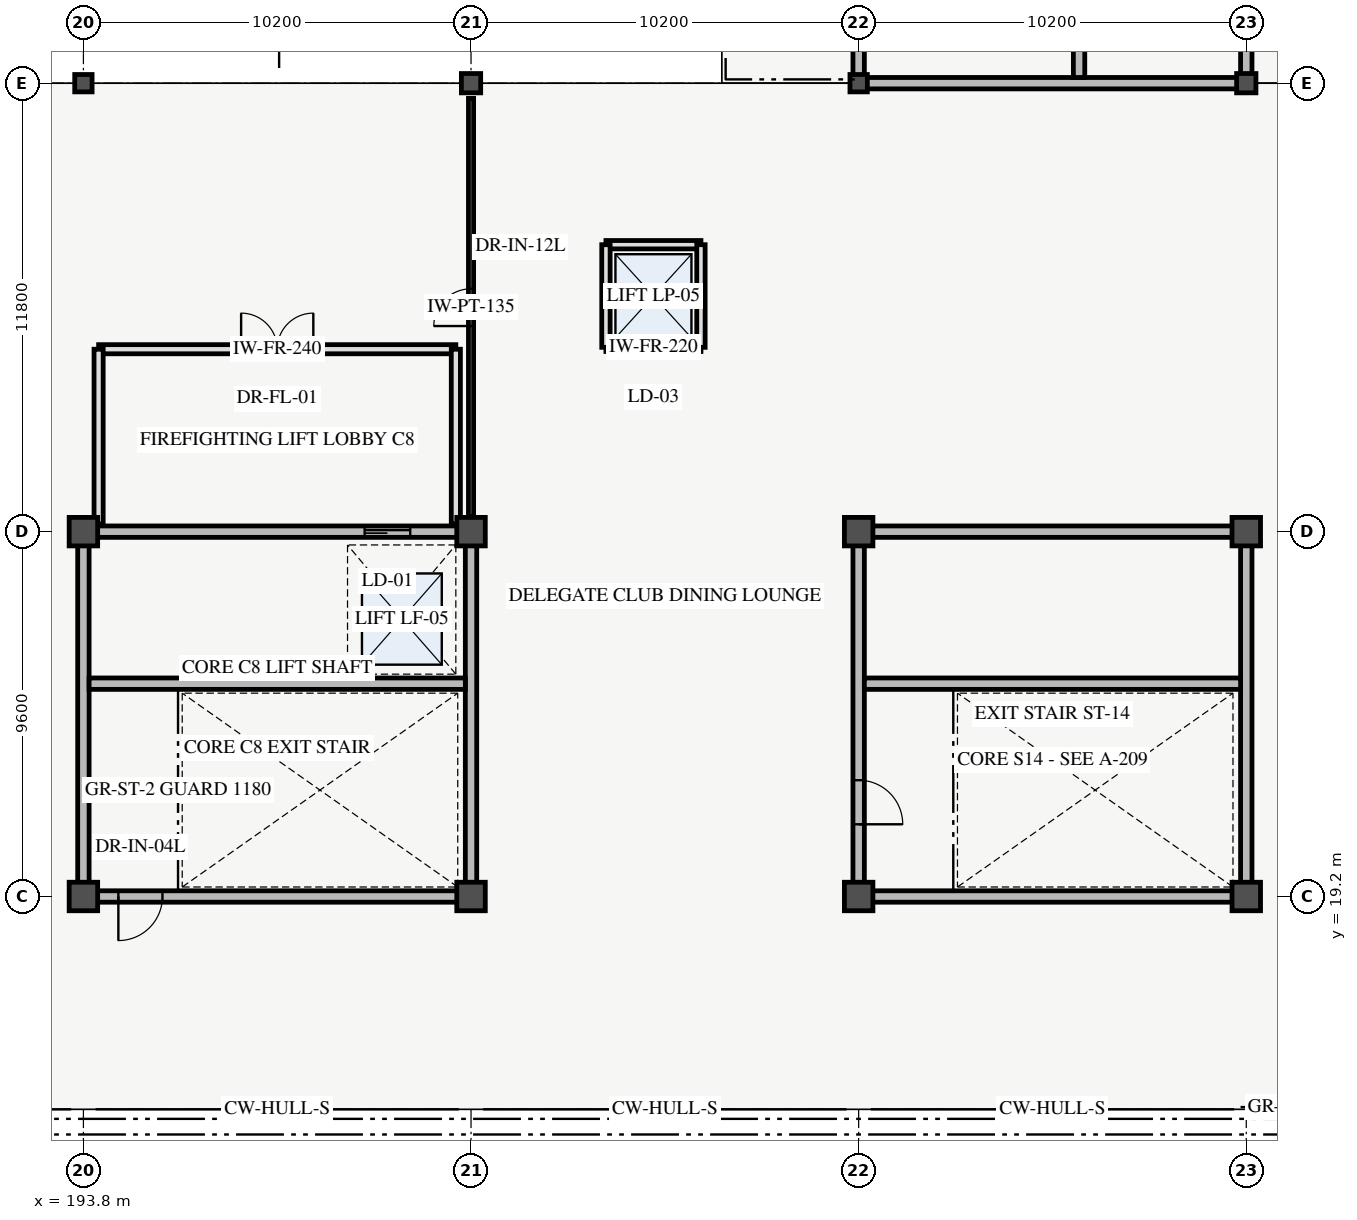
"""IFC4 building model, lengths in metres.
Left out: names, types, materials, properties, quantities, classifications, styles, units other than length and angle.
Written with IfcOpenShell. Run it as: python <this file> out.ifc"""

import sys

from ifc_helpers import new_model, si_unit, direction, frame, frame_2d, origin, origin_2d, place, context, subcontext, project, spatial, rectangle, hollow_circle, extrude, element, fill, save


model = new_model("IFC4")
c1 = context("Model", 3, precision=1e-05, world=origin(), true_north=direction((0.0, 1.0)))
c2 = subcontext(c1, "Body", "Model", "MODEL_VIEW")
j1 = project(units=[si_unit("LENGTHUNIT", "METRE"), si_unit("PLANEANGLEUNIT", "RADIAN")], contexts=[c1])
p1 = place(None, origin())
s1 = spatial("IfcSite", under=j1, at=p1, CompositionType="ELEMENT")
p2 = place(p1, origin())
s2 = spatial("IfcBuilding", under=s1, at=p2, CompositionType="ELEMENT")
p3 = place(p2, frame((0.0, 0.0, 10.8)))
s3 = spatial("IfcBuildingStorey", under=s2, at=p3, CompositionType="ELEMENT", Elevation=10.8)
for number, where, z_axis, x_axis in (
    (1, (193.8, 19.2, 0.0), (0.0, 0.0, 1.0), (1.0, 0.0, 0.0)),
    (2, (193.8, 28.8, 0.0), (0.0, 0.0, 1.0), (1.0, 0.0, 0.0)),
):
    element("IfcColumn", number, at=place(p3, frame(where, z_axis=z_axis, x_axis=x_axis)), inside=s3, PredefinedType="COLUMN", context=c2, shape_type="SweptSolid", body=[
        extrude(rectangle(XDim=0.75, YDim=0.75, at=origin_2d()), origin(), (0.0, 0.0, 1.0), 4.2),
    ])
p4 = place(p3, frame((193.8, 40.6, 0.0), z_axis=(0.0, 0.0, 1.0), x_axis=(1.0, 0.0, 0.0)))
e3 = element("IfcColumn", 3, at=p4, inside=s3, PredefinedType="COLUMN", context=c2, shape_type="SweptSolid", body=[
    extrude(hollow_circle(Radius=0.229, WallThickness=0.02, at=origin_2d()), origin(), (0.0, 0.0, 1.0), 4.2),
])
for number, where, z_axis, x_axis in (
    (4, (204.0, 19.2, 0.0), (0.0, 0.0, 1.0), (1.0, 0.0, 0.0)),
    (5, (204.0, 28.8, 0.0), (0.0, 0.0, 1.0), (1.0, 0.0, 0.0)),
):
    element("IfcColumn", number, at=place(p3, frame(where, z_axis=z_axis, x_axis=x_axis)), inside=s3, PredefinedType="COLUMN", context=c2, shape_type="SweptSolid", body=[
        extrude(rectangle(XDim=0.75, YDim=0.75, at=origin_2d()), origin(), (0.0, 0.0, 1.0), 4.2),
    ])
p5 = place(p3, frame((204.0, 40.6, 0.0), z_axis=(0.0, 0.0, 1.0), x_axis=(1.0, 0.0, 0.0)))
e6 = element("IfcColumn", 6, at=p5, inside=s3, PredefinedType="COLUMN", context=c2, shape_type="SweptSolid", body=[
    extrude(hollow_circle(Radius=0.254, WallThickness=0.02, at=origin_2d()), origin(), (0.0, 0.0, 1.0), 4.2),
])
for number, where, z_axis, x_axis in (
    (7, (214.2, 19.2, 0.0), (0.0, 0.0, 1.0), (1.0, 0.0, 0.0)),
    (8, (214.2, 28.8, 0.0), (0.0, 0.0, 1.0), (1.0, 0.0, 0.0)),
):
    element("IfcColumn", number, at=place(p3, frame(where, z_axis=z_axis, x_axis=x_axis)), inside=s3, PredefinedType="COLUMN", context=c2, shape_type="SweptSolid", body=[
        extrude(rectangle(XDim=0.75, YDim=0.75, at=origin_2d()), origin(), (0.0, 0.0, 1.0), 4.2),
    ])
p6 = place(p3, frame((214.2, 40.6, 0.0), z_axis=(0.0, 0.0, 1.0), x_axis=(1.0, 0.0, 0.0)))
e9 = element("IfcColumn", 9, at=p6, inside=s3, PredefinedType="COLUMN", context=c2, shape_type="SweptSolid", body=[
    extrude(hollow_circle(Radius=0.229, WallThickness=0.02, at=origin_2d()), origin(), (0.0, 0.0, 1.0), 4.2),
])
for number, where, z_axis, x_axis in (
    (10, (224.4, 19.2, 0.0), (0.0, 0.0, 1.0), (1.0, 0.0, 0.0)),
    (11, (224.4, 28.8, 0.0), (0.0, 0.0, 1.0), (1.0, 0.0, 0.0)),
):
    element("IfcColumn", number, at=place(p3, frame(where, z_axis=z_axis, x_axis=x_axis)), inside=s3, PredefinedType="COLUMN", context=c2, shape_type="SweptSolid", body=[
        extrude(rectangle(XDim=0.75, YDim=0.75, at=origin_2d()), origin(), (0.0, 0.0, 1.0), 4.2),
    ])
p7 = place(p3, frame((224.4, 40.6, 0.0), z_axis=(0.0, 0.0, 1.0), x_axis=(1.0, 0.0, 0.0)))
e12 = element("IfcColumn", 12, at=p7, inside=s3, PredefinedType="COLUMN", context=c2, shape_type="SweptSolid", body=[
    extrude(hollow_circle(Radius=0.254, WallThickness=0.02, at=origin_2d()), origin(), (0.0, 0.0, 1.0), 4.2),
])
p8 = place(p3, frame((193.8, 19.2, 0.0), z_axis=(0.0, 0.0, 1.0), x_axis=(1.0, 0.0, 0.0)))
e13 = element("IfcWall", 13, at=p8, inside=s3, PredefinedType="SHEAR", context=c2, shape_type="SweptSolid", body=[
    extrude(rectangle(XDim=10.2, YDim=0.3, at=frame_2d((5.1, 0.0))), origin(), (0.0, 0.0, 1.0), 4.2),
])
p9 = place(p8, frame((0.92, 0.0, 0.0)))
e14 = element("IfcOpeningElement", 14, at=p9, cuts=e13, PredefinedType="OPENING", context=c2, shape_type="SweptSolid", body=[
    extrude(rectangle(XDim=1.16, YDim=2.2, at=frame_2d((0.58, 1.1))), frame((0.0, 0.16, 0.0), z_axis=(0.0, -1.0, 0.0), x_axis=(1.0, 0.0, 0.0)), (0.0, 0.0, 1.0), 0.32),
])
p10 = place(p3, frame((193.8, 28.8, 0.0), z_axis=(0.0, 0.0, 1.0), x_axis=(1.0, 0.0, 0.0)))
e15 = element("IfcWall", 15, at=p10, inside=s3, PredefinedType="SHEAR", context=c2, shape_type="SweptSolid", body=[
    extrude(rectangle(XDim=10.2, YDim=0.3, at=frame_2d((5.1, 0.0))), origin(), (0.0, 0.0, 1.0), 4.2),
])
p11 = place(p10, frame((7.4, 0.0, 0.0)))
e16 = element("IfcOpeningElement", 16, at=p11, cuts=e15, PredefinedType="OPENING", context=c2, shape_type="SweptSolid", body=[
    extrude(rectangle(XDim=1.2, YDim=2.25, at=frame_2d((0.6, 1.125))), frame((0.0, 0.16, 0.0), z_axis=(0.0, -1.0, 0.0), x_axis=(1.0, 0.0, 0.0)), (0.0, 0.0, 1.0), 0.32),
])
for number, where, z_axis, x_axis in (
    (17, (193.8, 19.2, 0.0), (0.0, 0.0, 1.0), (0.0, 1.0, 0.0)),
    (18, (204.0, 19.2, 0.0), (0.0, 0.0, 1.0), (0.0, 1.0, 0.0)),
):
    element("IfcWall", number, at=place(p3, frame(where, z_axis=z_axis, x_axis=x_axis)), inside=s3, PredefinedType="SHEAR", context=c2, shape_type="SweptSolid", body=[
        extrude(rectangle(XDim=9.6, YDim=0.3, at=frame_2d((4.8, 0.0))), origin(), (0.0, 0.0, 1.0), 4.2),
    ])
p12 = place(p3, frame((193.95, 24.8, 0.0), z_axis=(0.0, 0.0, 1.0), x_axis=(1.0, 0.0, 0.0)))
e19 = element("IfcWall", 19, at=p12, inside=s3, PredefinedType="SHEAR", context=c2, shape_type="SweptSolid", body=[
    extrude(rectangle(XDim=9.9, YDim=0.3, at=frame_2d((4.95, 0.0))), origin(), (0.0, 0.0, 1.0), 4.2),
])
for number, where, z_axis, x_axis in (
    (20, (214.2, 19.2, 0.0), (0.0, 0.0, 1.0), (1.0, 0.0, 0.0)),
    (21, (214.2, 28.8, 0.0), (0.0, 0.0, 1.0), (1.0, 0.0, 0.0)),
):
    element("IfcWall", number, at=place(p3, frame(where, z_axis=z_axis, x_axis=x_axis)), inside=s3, PredefinedType="SHEAR", context=c2, shape_type="SweptSolid", body=[
        extrude(rectangle(XDim=10.2, YDim=0.3, at=frame_2d((5.1, 0.0))), origin(), (0.0, 0.0, 1.0), 4.2),
    ])
p13 = place(p3, frame((214.2, 19.2, 0.0), z_axis=(0.0, 0.0, 1.0), x_axis=(0.0, 1.0, 0.0)))
e22 = element("IfcWall", 22, at=p13, inside=s3, PredefinedType="SHEAR", context=c2, shape_type="SweptSolid", body=[
    extrude(rectangle(XDim=9.6, YDim=0.3, at=frame_2d((4.8, 0.0))), origin(), (0.0, 0.0, 1.0), 4.2),
])
p14 = place(p13, frame((1.9, 0.0, 0.0)))
e23 = element("IfcOpeningElement", 23, at=p14, cuts=e22, PredefinedType="OPENING", context=c2, shape_type="SweptSolid", body=[
    extrude(rectangle(XDim=1.16, YDim=2.2, at=frame_2d((0.58, 1.1))), frame((0.0, 0.16, 0.0), z_axis=(0.0, -1.0, 0.0), x_axis=(1.0, 0.0, 0.0)), (0.0, 0.0, 1.0), 0.32),
])
p15 = place(p3, frame((224.4, 19.2, 0.0), z_axis=(0.0, 0.0, 1.0), x_axis=(0.0, 1.0, 0.0)))
e24 = element("IfcWall", 24, at=p15, inside=s3, PredefinedType="SHEAR", context=c2, shape_type="SweptSolid", body=[
    extrude(rectangle(XDim=9.6, YDim=0.3, at=frame_2d((4.8, 0.0))), origin(), (0.0, 0.0, 1.0), 4.2),
])
p16 = place(p3, frame((214.35, 24.8, 0.0), z_axis=(0.0, 0.0, 1.0), x_axis=(1.0, 0.0, 0.0)))
e25 = element("IfcWall", 25, at=p16, inside=s3, PredefinedType="SHEAR", context=c2, shape_type="SweptSolid", body=[
    extrude(rectangle(XDim=9.9, YDim=0.3, at=frame_2d((4.95, 0.0))), origin(), (0.0, 0.0, 1.0), 4.2),
])
p17 = place(p3, frame((214.2, 40.6, 0.0), z_axis=(0.0, 0.0, 1.0), x_axis=(1.0, 0.0, 0.0)))
e26 = element("IfcWall", 26, at=p17, inside=s3, PredefinedType="SHEAR", context=c2, shape_type="SweptSolid", body=[
    extrude(rectangle(XDim=10.2, YDim=0.3, at=frame_2d((5.1, 0.0))), origin(), (0.0, 0.0, 1.0), 4.2),
])
p18 = place(p3, frame((214.2, 40.6, 0.0), z_axis=(0.0, 0.0, 1.0), x_axis=(0.0, 1.0, 0.0)))
e27 = element("IfcWall", 27, at=p18, inside=s3, PredefinedType="SHEAR", context=c2, shape_type="SweptSolid", body=[
    extrude(rectangle(XDim=11.8, YDim=0.3, at=frame_2d((5.9, 0.0))), origin(), (0.0, 0.0, 1.0), 4.2),
])
p19 = place(p18, frame((0.92, 0.0, 0.0)))
e28 = element("IfcOpeningElement", 28, at=p19, cuts=e27, PredefinedType="OPENING", context=c2, shape_type="SweptSolid", body=[
    extrude(rectangle(XDim=1.16, YDim=2.2, at=frame_2d((0.58, 1.1))), frame((0.0, 0.16, 0.0), z_axis=(0.0, -1.0, 0.0), x_axis=(1.0, 0.0, 0.0)), (0.0, 0.0, 1.0), 0.32),
])
p20 = place(p3, frame((224.4, 40.6, 0.0), z_axis=(0.0, 0.0, 1.0), x_axis=(0.0, 1.0, 0.0)))
e29 = element("IfcWall", 29, at=p20, inside=s3, PredefinedType="SHEAR", context=c2, shape_type="SweptSolid", body=[
    extrude(rectangle(XDim=11.8, YDim=0.3, at=frame_2d((5.9, 0.0))), origin(), (0.0, 0.0, 1.0), 4.2),
])
p21 = place(p3, frame((220.0, 40.75, 0.0), z_axis=(0.0, 0.0, 1.0), x_axis=(0.0, 1.0, 0.0)))
e30 = element("IfcWall", 30, at=p21, inside=s3, PredefinedType="SHEAR", context=c2, shape_type="SweptSolid", body=[
    extrude(rectangle(XDim=11.5, YDim=0.3, at=frame_2d((5.75, 0.0))), origin(), (0.0, 0.0, 1.0), 4.2),
])
p22 = place(p3, frame((207.55, 33.65, 0.0), z_axis=(0.0, 0.0, 1.0), x_axis=(1.0, 0.0, 0.0)))
e31 = element("IfcWall", 31, at=p22, inside=s3, PredefinedType="PARTITIONING", context=c2, shape_type="SweptSolid", body=[
    extrude(rectangle(XDim=2.5, YDim=0.22, at=frame_2d((1.25, 0.0))), origin(), (0.0, 0.0, 1.0), 3.9),
])
p23 = place(p22, frame((0.575, 0.0, 0.0)))
e32 = element("IfcOpeningElement", 32, at=p23, cuts=e31, PredefinedType="OPENING", context=c2, shape_type="SweptSolid", body=[
    extrude(rectangle(XDim=1.35, YDim=2.3, at=frame_2d((0.675, 1.15))), frame((0.0, 0.12, 0.0), z_axis=(0.0, -1.0, 0.0), x_axis=(1.0, 0.0, 0.0)), (0.0, 0.0, 1.0), 0.24),
])
p24 = place(p3, frame((207.55, 36.35, 0.0), z_axis=(0.0, 0.0, 1.0), x_axis=(1.0, 0.0, 0.0)))
e33 = element("IfcWall", 33, at=p24, inside=s3, PredefinedType="PARTITIONING", context=c2, shape_type="SweptSolid", body=[
    extrude(rectangle(XDim=2.5, YDim=0.22, at=frame_2d((1.25, 0.0))), origin(), (0.0, 0.0, 1.0), 3.9),
])
for number, where, z_axis, x_axis in (
    (34, (207.55, 33.65, 0.0), (0.0, 0.0, 1.0), (0.0, 1.0, 0.0)),
    (35, (210.05, 33.65, 0.0), (0.0, 0.0, 1.0), (0.0, 1.0, 0.0)),
):
    element("IfcWall", number, at=place(p3, frame(where, z_axis=z_axis, x_axis=x_axis)), inside=s3, PredefinedType="PARTITIONING", context=c2, shape_type="SweptSolid", body=[
        extrude(rectangle(XDim=2.7, YDim=0.22, at=frame_2d((1.35, 0.0))), origin(), (0.0, 0.0, 1.0), 3.9),
    ])
p25 = place(p3, frame((194.2, 33.6, 0.0), z_axis=(0.0, 0.0, 1.0), x_axis=(1.0, 0.0, 0.0)))
e36 = element("IfcWall", 36, at=p25, inside=s3, PredefinedType="PARTITIONING", context=c2, shape_type="SweptSolid", body=[
    extrude(rectangle(XDim=9.4, YDim=0.24, at=frame_2d((4.7, 0.0))), origin(), (0.0, 0.0, 1.0), 3.06),
])
p26 = place(p25, frame((3.75, 0.0, 0.0)))
e37 = element("IfcOpeningElement", 37, at=p26, cuts=e36, PredefinedType="OPENING", context=c2, shape_type="SweptSolid", body=[
    extrude(rectangle(XDim=1.9, YDim=2.25, at=frame_2d((0.95, 1.125))), frame((0.0, 0.13, 0.0), z_axis=(0.0, -1.0, 0.0), x_axis=(1.0, 0.0, 0.0)), (0.0, 0.0, 1.0), 0.26),
])
for number, where, z_axis, x_axis in (
    (38, (203.6, 29.0, 0.0), (0.0, 0.0, 1.0), (0.0, 1.0, 0.0)),
    (39, (194.2, 29.0, 0.0), (0.0, 0.0, 1.0), (0.0, 1.0, 0.0)),
):
    element("IfcWall", number, at=place(p3, frame(where, z_axis=z_axis, x_axis=x_axis)), inside=s3, PredefinedType="PARTITIONING", context=c2, shape_type="SweptSolid", body=[
        extrude(rectangle(XDim=4.6, YDim=0.24, at=frame_2d((2.3, 0.0))), origin(), (0.0, 0.0, 1.0), 3.06),
    ])
p27 = place(p3, frame((204.0, 29.2, 0.0), z_axis=(0.0, 0.0, 1.0), x_axis=(0.0, 1.0, 0.0)))
e40 = element("IfcWall", 40, at=p27, inside=s3, PredefinedType="PARTITIONING", context=c2, shape_type="SweptSolid", body=[
    extrude(rectangle(XDim=11.0, YDim=0.135, at=frame_2d((5.5, 0.0))), origin(), (0.0, 0.0, 1.0), 3.06),
])
p28 = place(p27, frame((5.01, 0.0, 0.0)))
e41 = element("IfcOpeningElement", 41, at=p28, cuts=e40, PredefinedType="OPENING", context=c2, shape_type="SweptSolid", body=[
    extrude(rectangle(XDim=0.98, YDim=2.12, at=frame_2d((0.49, 1.06))), frame((0.0, 0.077, 0.0), z_axis=(0.0, -1.0, 0.0), x_axis=(1.0, 0.0, 0.0)), (0.0, 0.0, 1.0), 0.155),
])
p29 = place(p9, origin())
e42 = element("IfcDoor", 42, at=p29, inside=s3, OperationType="SINGLE_SWING_LEFT", PredefinedType="DOOR", context=c2, shape_type="SweptSolid", body=[
    extrude(rectangle(XDim=1.16, YDim=2.2, at=frame_2d((0.58, 1.1))), frame((0.0, 0.025, 0.0), z_axis=(0.0, -1.0, 0.0), x_axis=(1.0, 0.0, 0.0)), (0.0, 0.0, 1.0), 0.05),
])
fill(e14, e42)
p30 = place(p11, origin())
e43 = element("IfcDoor", 43, at=p30, inside=s3, OperationType="SLIDING_TO_LEFT", PredefinedType="DOOR", context=c2, shape_type="SweptSolid", body=[
    extrude(rectangle(XDim=1.2, YDim=2.25, at=frame_2d((0.6, 1.125))), frame((0.0, 0.025, 0.0), z_axis=(0.0, -1.0, 0.0), x_axis=(1.0, 0.0, 0.0)), (0.0, 0.0, 1.0), 0.05),
])
fill(e16, e43)
p31 = place(p14, origin())
e44 = element("IfcDoor", 44, at=p31, inside=s3, OperationType="SINGLE_SWING_LEFT", PredefinedType="DOOR", context=c2, shape_type="SweptSolid", body=[
    extrude(rectangle(XDim=1.16, YDim=2.2, at=frame_2d((0.58, 1.1))), frame((0.0, 0.025, 0.0), z_axis=(0.0, -1.0, 0.0), x_axis=(1.0, 0.0, 0.0)), (0.0, 0.0, 1.0), 0.05),
])
fill(e23, e44)
p32 = place(p23, origin())
e45 = element("IfcDoor", 45, at=p32, inside=s3, OperationType="DOUBLE_DOOR_SLIDING", PredefinedType="DOOR", context=c2, shape_type="SweptSolid", body=[
    extrude(rectangle(XDim=1.35, YDim=2.3, at=frame_2d((0.675, 1.15))), frame((0.0, 0.025, 0.0), z_axis=(0.0, -1.0, 0.0), x_axis=(1.0, 0.0, 0.0)), (0.0, 0.0, 1.0), 0.05),
])
fill(e32, e45)
p33 = place(p26, origin())
e46 = element("IfcDoor", 46, at=p33, inside=s3, OperationType="DOUBLE_DOOR_SINGLE_SWING", PredefinedType="DOOR", context=c2, shape_type="SweptSolid", body=[
    extrude(rectangle(XDim=1.9, YDim=2.25, at=frame_2d((0.95, 1.125))), frame((0.0, 0.025, 0.0), z_axis=(0.0, -1.0, 0.0), x_axis=(1.0, 0.0, 0.0)), (0.0, 0.0, 1.0), 0.05),
])
fill(e37, e46)
p34 = place(p28, origin())
e47 = element("IfcDoor", 47, at=p34, inside=s3, OperationType="SINGLE_SWING_LEFT", PredefinedType="DOOR", context=c2, shape_type="SweptSolid", body=[
    extrude(rectangle(XDim=0.98, YDim=2.12, at=frame_2d((0.49, 1.06))), frame((0.0, 0.025, 0.0), z_axis=(0.0, -1.0, 0.0), x_axis=(1.0, 0.0, 0.0)), (0.0, 0.0, 1.0), 0.05),
])
fill(e41, e47)
save(model, sys.argv[1])
